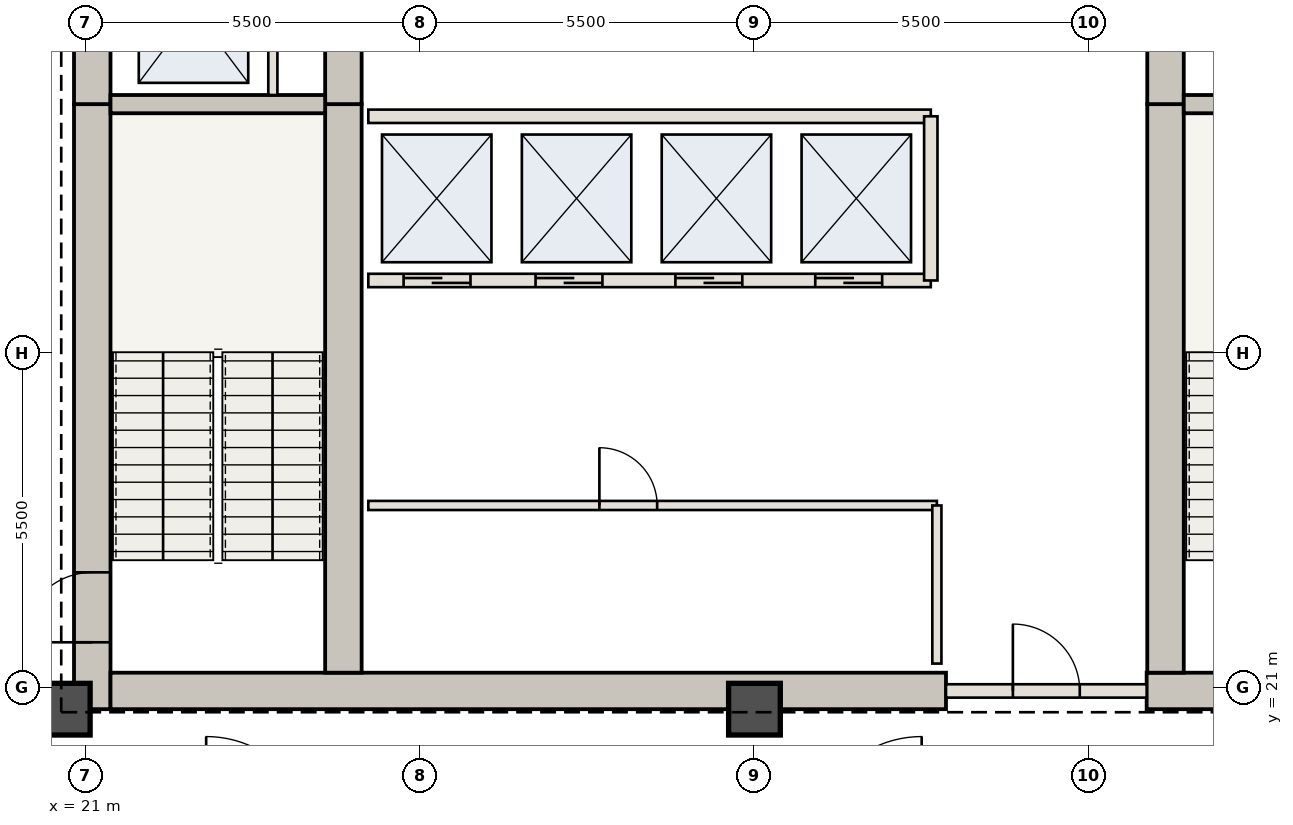
"""IFC4 building model, lengths in metres.
Left out: names, types, materials, properties, quantities, classifications, styles, units other than length and angle.
Written with IfcOpenShell. Run it as: python <this file> out.ifc"""

import sys

from ifc_helpers import new_model, si_unit, direction, frame, frame_2d, origin, origin_2d, place, context, subcontext, project, spatial, rectangle, extrude, element, fill, save


model = new_model("IFC4")
c1 = context("Model", 3, precision=1e-05, world=origin(), true_north=direction((0.0, 1.0)))
c2 = subcontext(c1, "Body", "Model", "MODEL_VIEW")
j1 = project(units=[si_unit("LENGTHUNIT", "METRE"), si_unit("PLANEANGLEUNIT", "RADIAN")], contexts=[c1])
p1 = place(None, origin())
s1 = spatial("IfcSite", under=j1, at=p1, CompositionType="ELEMENT")
p2 = place(p1, origin())
s2 = spatial("IfcBuilding", under=s1, at=p2, CompositionType="ELEMENT")
p3 = place(p2, frame((0.0, 0.0, 182.35)))
s3 = spatial("IfcBuildingStorey", under=s2, at=p3, CompositionType="ELEMENT", Elevation=182.35)
p4 = place(p3, frame((21.11, 20.65, 0.0), z_axis=(0.0, 0.0, 1.0), x_axis=(0.0, 1.0, 0.0)))
e1 = element("IfcWall", 1, at=p4, inside=s3, PredefinedType="SHEAR", context=c2, shape_type="SweptSolid", body=[
    extrude(rectangle(XDim=9.95, YDim=0.6, at=frame_2d((4.975, 0.0))), origin(), (0.0, 0.0, 1.0), 4.55),
])
p5 = place(p4, frame((1.1, 0.0, 0.0)))
e2 = element("IfcOpeningElement", 2, at=p5, cuts=e1, PredefinedType="OPENING", context=c2, shape_type="SweptSolid", body=[
    extrude(rectangle(XDim=1.15, YDim=2.15, at=frame_2d((0.575, 1.075))), frame((0.0, 0.31, 0.0), z_axis=(0.0, -1.0, 0.0), x_axis=(1.0, 0.0, 0.0)), (0.0, 0.0, 1.0), 0.62),
])
p6 = place(p3, frame((21.11, 30.6, 0.0), z_axis=(0.0, 0.0, 1.0), x_axis=(0.0, 1.0, 0.0)))
e3 = element("IfcWall", 3, at=p6, inside=s3, PredefinedType="SHEAR", context=c2, shape_type="SweptSolid", body=[
    extrude(rectangle(XDim=12.7, YDim=0.6, at=frame_2d((6.35, 0.0))), origin(), (0.0, 0.0, 1.0), 4.55),
])
p7 = place(p6, frame((4.2, 0.0, 0.0)))
e4 = element("IfcOpeningElement", 4, at=p7, cuts=e3, PredefinedType="OPENING", context=c2, shape_type="SweptSolid", body=[
    extrude(rectangle(XDim=1.1, YDim=2.15, at=frame_2d((0.55, 1.075))), frame((0.0, 0.31, 0.0), z_axis=(0.0, -1.0, 0.0), x_axis=(1.0, 0.0, 0.0)), (0.0, 0.0, 1.0), 0.62),
])
p8 = place(p6, frame((9.2, 0.0, 0.0)))
e5 = element("IfcOpeningElement", 5, at=p8, cuts=e3, PredefinedType="OPENING", context=c2, shape_type="SweptSolid", body=[
    extrude(rectangle(XDim=0.92, YDim=2.1, at=frame_2d((0.46, 1.05))), frame((0.0, 0.31, 0.0), z_axis=(0.0, -1.0, 0.0), x_axis=(1.0, 0.0, 0.0)), (0.0, 0.0, 1.0), 0.62),
])
p9 = place(p3, frame((21.41, 20.95, 0.0), z_axis=(0.0, 0.0, 1.0), x_axis=(1.0, 0.0, 0.0)))
e6 = element("IfcWall", 6, at=p9, inside=s3, PredefinedType="SHEAR", context=c2, shape_type="SweptSolid", body=[
    extrude(rectangle(XDim=13.74, YDim=0.6, at=frame_2d((6.87, 0.0))), origin(), (0.0, 0.0, 1.0), 4.55),
])
p10 = place(p3, frame((38.45, 20.95, 0.0), z_axis=(0.0, 0.0, 1.0), x_axis=(1.0, 0.0, 0.0)))
e7 = element("IfcWall", 7, at=p10, inside=s3, PredefinedType="SHEAR", context=c2, shape_type="SweptSolid", body=[
    extrude(rectangle(XDim=4.14, YDim=0.6, at=frame_2d((2.07, 0.0))), origin(), (0.0, 0.0, 1.0), 4.55),
])
p11 = place(p3, frame((25.24, 21.25, 0.0), z_axis=(0.0, 0.0, 1.0), x_axis=(0.0, 1.0, 0.0)))
e8 = element("IfcWall", 8, at=p11, inside=s3, PredefinedType="SHEAR", context=c2, shape_type="SweptSolid", body=[
    extrude(rectangle(XDim=9.35, YDim=0.6, at=frame_2d((4.675, 0.0))), origin(), (0.0, 0.0, 1.0), 4.55),
])
p12 = place(p3, frame((25.24, 30.6, 0.0), z_axis=(0.0, 0.0, 1.0), x_axis=(0.0, 1.0, 0.0)))
e9 = element("IfcWall", 9, at=p12, inside=s3, PredefinedType="SHEAR", context=c2, shape_type="SweptSolid", body=[
    extrude(rectangle(XDim=12.1, YDim=0.6, at=frame_2d((6.05, 0.0))), origin(), (0.0, 0.0, 1.0), 4.55),
])
p13 = place(p12, frame((6.25, 0.0, 0.0)))
e10 = element("IfcOpeningElement", 10, at=p13, cuts=e9, PredefinedType="OPENING", context=c2, shape_type="SweptSolid", body=[
    extrude(rectangle(XDim=1.1, YDim=2.15, at=frame_2d((0.55, 1.075))), frame((0.0, 0.31, 0.0), z_axis=(0.0, -1.0, 0.0), x_axis=(1.0, 0.0, 0.0)), (0.0, 0.0, 1.0), 0.62),
])
p14 = place(p3, frame((38.76, 21.25, 0.0), z_axis=(0.0, 0.0, 1.0), x_axis=(0.0, 1.0, 0.0)))
e11 = element("IfcWall", 11, at=p14, inside=s3, PredefinedType="SHEAR", context=c2, shape_type="SweptSolid", body=[
    extrude(rectangle(XDim=9.35, YDim=0.6, at=frame_2d((4.675, 0.0))), origin(), (0.0, 0.0, 1.0), 4.55),
])
p15 = place(p3, frame((38.76, 30.6, 0.0), z_axis=(0.0, 0.0, 1.0), x_axis=(0.0, 1.0, 0.0)))
e12 = element("IfcWall", 12, at=p15, inside=s3, PredefinedType="SHEAR", context=c2, shape_type="SweptSolid", body=[
    extrude(rectangle(XDim=12.1, YDim=0.6, at=frame_2d((6.05, 0.0))), origin(), (0.0, 0.0, 1.0), 4.55),
])
for number, where, z_axis, x_axis in (
    (13, (20.65, 20.65, 0.0), (0.0, 0.0, 1.0), (1.0, 0.0, 0.0)),
    (14, (32.0, 20.65, 0.0), (0.0, 0.0, 1.0), (1.0, 0.0, 0.0)),
):
    element("IfcColumn", number, at=place(p3, frame(where, z_axis=z_axis, x_axis=x_axis)), inside=s3, PredefinedType="COLUMN", context=c2, shape_type="SweptSolid", body=[
        extrude(rectangle(XDim=0.85, YDim=0.85, at=origin_2d()), origin(), (0.0, 0.0, 1.0), 4.55),
    ])
for number, where, z_axis, x_axis in (
    (15, (21.41, 30.6, 0.0), (0.0, 0.0, 1.0), (1.0, 0.0, 0.0)),
    (16, (39.06, 30.6, 0.0), (0.0, 0.0, 1.0), (1.0, 0.0, 0.0)),
):
    element("IfcWall", number, at=place(p3, frame(where, z_axis=z_axis, x_axis=x_axis)), inside=s3, PredefinedType="SHEAR", context=c2, shape_type="SweptSolid", body=[
        extrude(rectangle(XDim=3.53, YDim=0.3, at=frame_2d((1.765, 0.0))), origin(), (0.0, 0.0, 1.0), 4.13),
    ])
p16 = place(p3, frame((24.08, 30.75, 0.0), z_axis=(0.0, 0.0, 1.0), x_axis=(0.0, 1.0, 0.0)))
e17 = element("IfcWall", 17, at=p16, inside=s3, PredefinedType="STANDARD", context=c2, shape_type="SweptSolid", body=[
    extrude(rectangle(XDim=2.65, YDim=0.15, at=frame_2d((1.325, 0.0))), origin(), (0.0, 0.0, 1.0), 4.13),
])
p17 = place(p3, frame((35.15, 20.95, 0.0), z_axis=(0.0, 0.0, 1.0), x_axis=(1.0, 0.0, 0.0)))
e18 = element("IfcWall", 18, at=p17, inside=s3, PredefinedType="STANDARD", context=c2, shape_type="SweptSolid", body=[
    extrude(rectangle(XDim=3.3, YDim=0.22, at=frame_2d((1.65, 0.0))), origin(), (0.0, 0.0, 1.0), 4.13),
])
p18 = place(p17, frame((1.1, 0.0, 0.0)))
e19 = element("IfcOpeningElement", 19, at=p18, cuts=e18, PredefinedType="OPENING", context=c2, shape_type="SweptSolid", body=[
    extrude(rectangle(XDim=1.1, YDim=2.15, at=frame_2d((0.55, 1.075))), frame((0.0, 0.12, 0.0), z_axis=(0.0, -1.0, 0.0), x_axis=(1.0, 0.0, 0.0)), (0.0, 0.0, 1.0), 0.24),
])
p19 = place(p3, frame((25.65, 24.0, 0.0), z_axis=(0.0, 0.0, 1.0), x_axis=(1.0, 0.0, 0.0)))
e20 = element("IfcWall", 20, at=p19, inside=s3, PredefinedType="STANDARD", context=c2, shape_type="SweptSolid", body=[
    extrude(rectangle(XDim=9.35, YDim=0.15, at=frame_2d((4.675, 0.0))), origin(), (0.0, 0.0, 1.0), 4.13),
])
p20 = place(p19, frame((3.8, 0.0, 0.0)))
e21 = element("IfcOpeningElement", 21, at=p20, cuts=e20, PredefinedType="OPENING", context=c2, shape_type="SweptSolid", body=[
    extrude(rectangle(XDim=0.95, YDim=2.15, at=frame_2d((0.475, 1.075))), frame((0.0, 0.085, 0.0), z_axis=(0.0, -1.0, 0.0), x_axis=(1.0, 0.0, 0.0)), (0.0, 0.0, 1.0), 0.17),
])
p21 = place(p3, frame((35.0, 21.4, 0.0), z_axis=(0.0, 0.0, 1.0), x_axis=(0.0, 1.0, 0.0)))
e22 = element("IfcWall", 22, at=p21, inside=s3, PredefinedType="STANDARD", context=c2, shape_type="SweptSolid", body=[
    extrude(rectangle(XDim=2.6, YDim=0.15, at=frame_2d((1.3, 0.0))), origin(), (0.0, 0.0, 1.0), 4.13),
])
p22 = place(p3, frame((25.65, 27.7, 0.0), z_axis=(0.0, 0.0, 1.0), x_axis=(1.0, 0.0, 0.0)))
e23 = element("IfcWall", 23, at=p22, inside=s3, PredefinedType="STANDARD", context=c2, shape_type="SweptSolid", body=[
    extrude(rectangle(XDim=9.25, YDim=0.22, at=frame_2d((4.625, 0.0))), origin(), (0.0, 0.0, 1.0), 4.13),
])
p23 = place(p22, frame((0.58, 0.0, 0.0)))
e24 = element("IfcOpeningElement", 24, at=p23, cuts=e23, PredefinedType="OPENING", context=c2, shape_type="SweptSolid", body=[
    extrude(rectangle(XDim=1.1, YDim=2.15, at=frame_2d((0.55, 1.075))), frame((0.0, 0.12, 0.0), z_axis=(0.0, -1.0, 0.0), x_axis=(1.0, 0.0, 0.0)), (0.0, 0.0, 1.0), 0.24),
])
p24 = place(p22, frame((2.75, 0.0, 0.0)))
e25 = element("IfcOpeningElement", 25, at=p24, cuts=e23, PredefinedType="OPENING", context=c2, shape_type="SweptSolid", body=[
    extrude(rectangle(XDim=1.1, YDim=2.15, at=frame_2d((0.55, 1.075))), frame((0.0, 0.12, 0.0), z_axis=(0.0, -1.0, 0.0), x_axis=(1.0, 0.0, 0.0)), (0.0, 0.0, 1.0), 0.24),
])
p25 = place(p22, frame((5.05, 0.0, 0.0)))
e26 = element("IfcOpeningElement", 26, at=p25, cuts=e23, PredefinedType="OPENING", context=c2, shape_type="SweptSolid", body=[
    extrude(rectangle(XDim=1.1, YDim=2.15, at=frame_2d((0.55, 1.075))), frame((0.0, 0.12, 0.0), z_axis=(0.0, -1.0, 0.0), x_axis=(1.0, 0.0, 0.0)), (0.0, 0.0, 1.0), 0.24),
])
p26 = place(p22, frame((7.35, 0.0, 0.0)))
e27 = element("IfcOpeningElement", 27, at=p26, cuts=e23, PredefinedType="OPENING", context=c2, shape_type="SweptSolid", body=[
    extrude(rectangle(XDim=1.1, YDim=2.15, at=frame_2d((0.55, 1.075))), frame((0.0, 0.12, 0.0), z_axis=(0.0, -1.0, 0.0), x_axis=(1.0, 0.0, 0.0)), (0.0, 0.0, 1.0), 0.24),
])
p27 = place(p3, frame((25.65, 30.4, 0.0), z_axis=(0.0, 0.0, 1.0), x_axis=(1.0, 0.0, 0.0)))
e28 = element("IfcWall", 28, at=p27, inside=s3, PredefinedType="STANDARD", context=c2, shape_type="SweptSolid", body=[
    extrude(rectangle(XDim=9.25, YDim=0.22, at=frame_2d((4.625, 0.0))), origin(), (0.0, 0.0, 1.0), 4.13),
])
p28 = place(p3, frame((34.9, 27.7, 0.0), z_axis=(0.0, 0.0, 1.0), x_axis=(0.0, 1.0, 0.0)))
e29 = element("IfcWall", 29, at=p28, inside=s3, PredefinedType="STANDARD", context=c2, shape_type="SweptSolid", body=[
    extrude(rectangle(XDim=2.7, YDim=0.22, at=frame_2d((1.35, 0.0))), origin(), (0.0, 0.0, 1.0), 4.13),
])
p29 = place(p5, origin())
e30 = element("IfcDoor", 30, at=p29, inside=s3, OperationType="SINGLE_SWING_LEFT", PredefinedType="DOOR", context=c2, shape_type="SweptSolid", body=[
    extrude(rectangle(XDim=1.15, YDim=2.15, at=frame_2d((0.575, 1.075))), frame((0.0, 0.025, 0.0), z_axis=(0.0, -1.0, 0.0), x_axis=(1.0, 0.0, 0.0)), (0.0, 0.0, 1.0), 0.05),
])
fill(e2, e30)
p30 = place(p18, origin())
e31 = element("IfcDoor", 31, at=p30, inside=s3, OperationType="SINGLE_SWING_LEFT", PredefinedType="DOOR", context=c2, shape_type="SweptSolid", body=[
    extrude(rectangle(XDim=1.1, YDim=2.15, at=frame_2d((0.55, 1.075))), frame((0.0, 0.025, 0.0), z_axis=(0.0, -1.0, 0.0), x_axis=(1.0, 0.0, 0.0)), (0.0, 0.0, 1.0), 0.05),
])
fill(e19, e31)
p31 = place(p20, origin())
e32 = element("IfcDoor", 32, at=p31, inside=s3, OperationType="SINGLE_SWING_LEFT", PredefinedType="DOOR", context=c2, shape_type="SweptSolid", body=[
    extrude(rectangle(XDim=0.95, YDim=2.15, at=frame_2d((0.475, 1.075))), frame((0.0, 0.025, 0.0), z_axis=(0.0, -1.0, 0.0), x_axis=(1.0, 0.0, 0.0)), (0.0, 0.0, 1.0), 0.05),
])
fill(e21, e32)
p32 = place(p23, origin())
e33 = element("IfcDoor", 33, at=p32, inside=s3, OperationType="DOUBLE_DOOR_SLIDING", PredefinedType="DOOR", context=c2, shape_type="SweptSolid", body=[
    extrude(rectangle(XDim=1.1, YDim=2.15, at=frame_2d((0.55, 1.075))), frame((0.0, 0.025, 0.0), z_axis=(0.0, -1.0, 0.0), x_axis=(1.0, 0.0, 0.0)), (0.0, 0.0, 1.0), 0.05),
])
fill(e24, e33)
p33 = place(p24, origin())
e34 = element("IfcDoor", 34, at=p33, inside=s3, OperationType="DOUBLE_DOOR_SLIDING", PredefinedType="DOOR", context=c2, shape_type="SweptSolid", body=[
    extrude(rectangle(XDim=1.1, YDim=2.15, at=frame_2d((0.55, 1.075))), frame((0.0, 0.025, 0.0), z_axis=(0.0, -1.0, 0.0), x_axis=(1.0, 0.0, 0.0)), (0.0, 0.0, 1.0), 0.05),
])
fill(e25, e34)
p34 = place(p25, origin())
e35 = element("IfcDoor", 35, at=p34, inside=s3, OperationType="DOUBLE_DOOR_SLIDING", PredefinedType="DOOR", context=c2, shape_type="SweptSolid", body=[
    extrude(rectangle(XDim=1.1, YDim=2.15, at=frame_2d((0.55, 1.075))), frame((0.0, 0.025, 0.0), z_axis=(0.0, -1.0, 0.0), x_axis=(1.0, 0.0, 0.0)), (0.0, 0.0, 1.0), 0.05),
])
fill(e26, e35)
p35 = place(p26, origin())
e36 = element("IfcDoor", 36, at=p35, inside=s3, OperationType="DOUBLE_DOOR_SLIDING", PredefinedType="DOOR", context=c2, shape_type="SweptSolid", body=[
    extrude(rectangle(XDim=1.1, YDim=2.15, at=frame_2d((0.55, 1.075))), frame((0.0, 0.025, 0.0), z_axis=(0.0, -1.0, 0.0), x_axis=(1.0, 0.0, 0.0)), (0.0, 0.0, 1.0), 0.05),
])
fill(e27, e36)
save(model, sys.argv[1])
